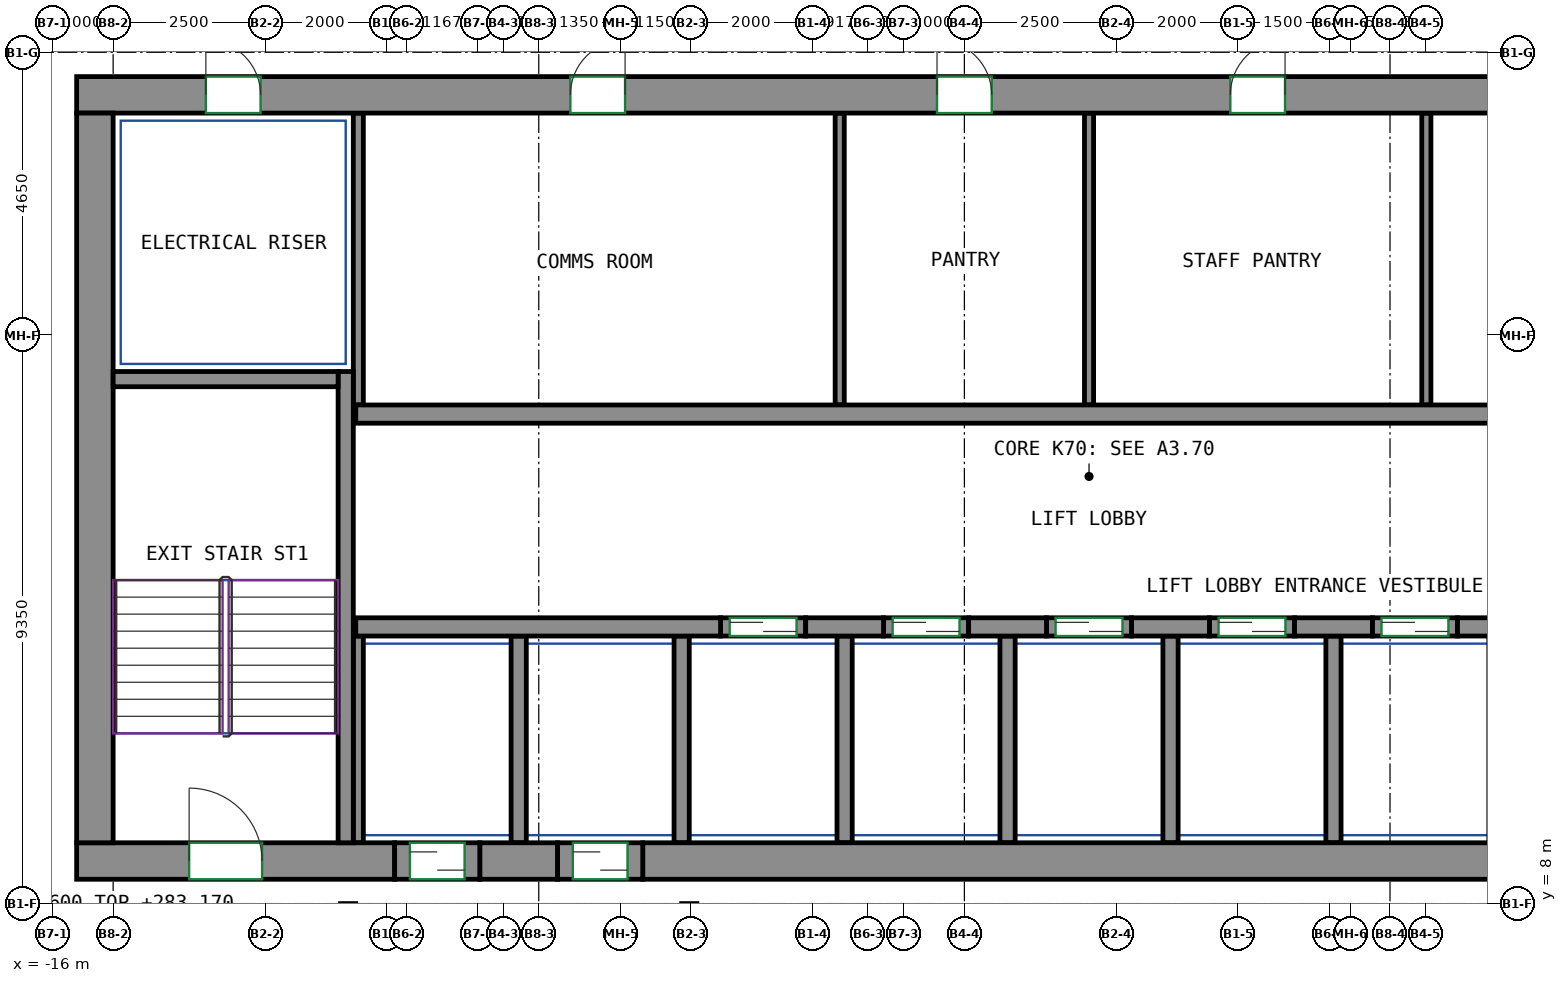
"""IFC4 building model, lengths in metres.
Left out: names, types, materials, properties, quantities, classifications, styles, units other than length and angle.
Written with IfcOpenShell. Run it as: python <this file> out.ifc"""

import sys

from ifc_helpers import new_model, si_unit, direction, frame, frame_2d, origin, place, context, subcontext, project, spatial, rectangle, extrude, source, transform, mapped, element, fill, save


model = new_model("IFC4")
c1 = context("Model", 3, precision=1e-05, world=origin(), true_north=direction((0.0, 1.0)))
c2 = subcontext(c1, "Body", "Model", "MODEL_VIEW")
j1 = project(units=[si_unit("LENGTHUNIT", "METRE"), si_unit("PLANEANGLEUNIT", "RADIAN")], contexts=[c1])
p1 = place(None, origin())
s1 = spatial("IfcSite", under=j1, at=p1, CompositionType="ELEMENT")
p2 = place(p1, origin())
s2 = spatial("IfcBuilding", under=s1, at=p2, CompositionType="ELEMENT")
p3 = place(p2, frame((0.0, 0.0, 280.6)))
s3 = spatial("IfcBuildingStorey", under=s2, at=p3, CompositionType="ELEMENT", Elevation=280.6)
m1 = source(origin(), c2, "Body", "SweptSolid", [
    extrude(rectangle(XDim=5.23, YDim=0.6, at=frame_2d((2.615, 0.0))), origin(), (0.0, 0.0, 1.0), 3.12),
])
p4 = place(p3, frame((-15.6, 8.7, 0.0), z_axis=(0.0, 0.0, 1.0), x_axis=(1.0, 0.0, 0.0)))
e1 = element("IfcWall", 1, at=p4, inside=s3, PredefinedType="SHEAR", context=c2, shape_type="MappedRepresentation", body=[
    mapped(m1, transform((0.0, 0.0, 0.0))),
])
p5 = place(p4, frame((1.85, 0.0, 0.0)))
e2 = element("IfcOpeningElement", 2, at=p5, cuts=e1, PredefinedType="OPENING", context=c2, shape_type="SweptSolid", body=[
    extrude(rectangle(XDim=1.2, YDim=2.1, at=frame_2d((0.6, 1.05))), frame((0.0, 0.31, 0.0), z_axis=(0.0, -1.0, 0.0), x_axis=(1.0, 0.0, 0.0)), (0.0, 0.0, 1.0), 0.62),
])
m2 = source(origin(), c2, "Body", "SweptSolid", [
    extrude(rectangle(XDim=1.28, YDim=0.6, at=frame_2d((0.64, 0.0))), origin(), (0.0, 0.0, 1.0), 3.12),
])
p6 = place(p3, frame((-8.97, 8.7, 0.0), z_axis=(0.0, 0.0, 1.0), x_axis=(1.0, 0.0, 0.0)))
e3 = element("IfcWall", 3, at=p6, inside=s3, PredefinedType="SHEAR", context=c2, shape_type="MappedRepresentation", body=[
    mapped(m2, transform((0.0, 0.0, 0.0))),
])
m3 = source(origin(), c2, "Body", "SweptSolid", [
    extrude(rectangle(XDim=14.18, YDim=0.6, at=frame_2d((7.09, 0.0))), origin(), (0.0, 0.0, 1.0), 3.12),
])
p7 = place(p3, frame((-6.29, 8.7, 0.0), z_axis=(0.0, 0.0, 1.0), x_axis=(1.0, 0.0, 0.0)))
e4 = element("IfcWall", 4, at=p7, inside=s3, PredefinedType="SHEAR", context=c2, shape_type="MappedRepresentation", body=[
    mapped(m3, transform((0.0, 0.0, 0.0))),
])
m4 = source(origin(), c2, "Body", "SweptSolid", [
    extrude(rectangle(XDim=33.3, YDim=0.6, at=frame_2d((16.65, 0.0))), origin(), (0.0, 0.0, 1.0), 3.12),
])
p8 = place(p3, frame((-15.6, 21.3, 0.0), z_axis=(0.0, 0.0, 1.0), x_axis=(1.0, 0.0, 0.0)))
e5 = element("IfcWall", 5, at=p8, inside=s3, PredefinedType="SHEAR", context=c2, shape_type="MappedRepresentation", body=[
    mapped(m4, transform((0.0, 0.0, 0.0))),
])
p9 = place(p8, frame((8.12, 0.0, 0.0)))
e6 = element("IfcOpeningElement", 6, at=p9, cuts=e5, PredefinedType="OPENING", context=c2, shape_type="SweptSolid", body=[
    extrude(rectangle(XDim=0.9, YDim=2.1, at=frame_2d((0.45, 1.05))), frame((0.0, 0.31, 0.0), z_axis=(0.0, -1.0, 0.0), x_axis=(1.0, 0.0, 0.0)), (0.0, 0.0, 1.0), 0.62),
])
p10 = place(p8, frame((14.15, 0.0, 0.0)))
e7 = element("IfcOpeningElement", 7, at=p10, cuts=e5, PredefinedType="OPENING", context=c2, shape_type="SweptSolid", body=[
    extrude(rectangle(XDim=0.9, YDim=2.1, at=frame_2d((0.45, 1.05))), frame((0.0, 0.31, 0.0), z_axis=(0.0, -1.0, 0.0), x_axis=(1.0, 0.0, 0.0)), (0.0, 0.0, 1.0), 0.62),
])
p11 = place(p8, frame((18.974, 0.0, 0.0)))
e8 = element("IfcOpeningElement", 8, at=p11, cuts=e5, PredefinedType="OPENING", context=c2, shape_type="SweptSolid", body=[
    extrude(rectangle(XDim=0.9, YDim=2.1, at=frame_2d((0.45, 1.05))), frame((0.0, 0.31, 0.0), z_axis=(0.0, -1.0, 0.0), x_axis=(1.0, 0.0, 0.0)), (0.0, 0.0, 1.0), 0.62),
])
p12 = place(p8, frame((23.664, 0.0, 0.0)))
e9 = element("IfcOpeningElement", 9, at=p12, cuts=e5, PredefinedType="OPENING", context=c2, shape_type="SweptSolid", body=[
    extrude(rectangle(XDim=0.9, YDim=2.1, at=frame_2d((0.45, 1.05))), frame((0.0, 0.31, 0.0), z_axis=(0.0, -1.0, 0.0), x_axis=(1.0, 0.0, 0.0)), (0.0, 0.0, 1.0), 0.62),
])
p13 = place(p8, frame((26.92, 0.0, 0.0)))
e10 = element("IfcOpeningElement", 10, at=p13, cuts=e5, PredefinedType="OPENING", context=c2, shape_type="SweptSolid", body=[
    extrude(rectangle(XDim=0.9, YDim=2.1, at=frame_2d((0.45, 1.05))), frame((0.0, 0.31, 0.0), z_axis=(0.0, -1.0, 0.0), x_axis=(1.0, 0.0, 0.0)), (0.0, 0.0, 1.0), 0.62),
])
p14 = place(p8, frame((2.125, 0.0, 0.0)))
e11 = element("IfcOpeningElement", 11, at=p14, cuts=e5, PredefinedType="OPENING", context=c2, shape_type="SweptSolid", body=[
    extrude(rectangle(XDim=0.9, YDim=2.1, at=frame_2d((0.45, 1.05))), frame((0.0, 0.31, 0.0), z_axis=(0.0, -1.0, 0.0), x_axis=(1.0, 0.0, 0.0)), (0.0, 0.0, 1.0), 0.62),
])
p15 = place(p8, frame((30.275, 0.0, 0.0)))
e12 = element("IfcOpeningElement", 12, at=p15, cuts=e5, PredefinedType="OPENING", context=c2, shape_type="SweptSolid", body=[
    extrude(rectangle(XDim=0.9, YDim=2.1, at=frame_2d((0.45, 1.05))), frame((0.0, 0.31, 0.0), z_axis=(0.0, -1.0, 0.0), x_axis=(1.0, 0.0, 0.0)), (0.0, 0.0, 1.0), 0.62),
])
m5 = source(origin(), c2, "Body", "SweptSolid", [
    extrude(rectangle(XDim=12.0, YDim=0.6, at=frame_2d((6.0, 0.0))), origin(), (0.0, 0.0, 1.0), 3.12),
])
p16 = place(p3, frame((-15.3, 9.0, 0.0), z_axis=(0.0, 0.0, 1.0), x_axis=(0.0, 1.0, 0.0)))
e13 = element("IfcWall", 13, at=p16, inside=s3, PredefinedType="SHEAR", context=c2, shape_type="MappedRepresentation", body=[
    mapped(m5, transform((0.0, 0.0, 0.0))),
])
m6 = source(origin(), c2, "Body", "SweptSolid", [
    extrude(rectangle(XDim=7.75, YDim=0.25, at=frame_2d((3.875, 0.0))), origin(), (0.0, 0.0, 1.0), 3.12),
])
p17 = place(p3, frame((-11.175, 9.0, 0.0), z_axis=(0.0, 0.0, 1.0), x_axis=(0.0, 1.0, 0.0)))
e14 = element("IfcWall", 14, at=p17, inside=s3, PredefinedType="SHEAR", context=c2, shape_type="MappedRepresentation", body=[
    mapped(m6, transform((0.0, 0.0, 0.0))),
])
m7 = source(origin(), c2, "Body", "SweptSolid", [
    extrude(rectangle(XDim=3.7, YDim=0.25, at=frame_2d((1.85, 0.0))), origin(), (0.0, 0.0, 1.0), 3.12),
])
p18 = place(p3, frame((-15.0, 16.625, 0.0), z_axis=(0.0, 0.0, 1.0), x_axis=(1.0, 0.0, 0.0)))
e15 = element("IfcWall", 15, at=p18, inside=s3, PredefinedType="SHEAR", context=c2, shape_type="MappedRepresentation", body=[
    mapped(m7, transform((0.0, 0.0, 0.0))),
])
m8 = source(origin(), c2, "Body", "SweptSolid", [
    extrude(rectangle(XDim=6.0, YDim=0.3, at=frame_2d((3.0, 0.0))), origin(), (0.0, 0.0, 1.0), 3.12),
])
p19 = place(p3, frame((-11.01, 12.55, 0.0), z_axis=(0.0, 0.0, 1.0), x_axis=(1.0, 0.0, 0.0)))
e16 = element("IfcWall", 16, at=p19, inside=s3, PredefinedType="SHEAR", context=c2, shape_type="MappedRepresentation", body=[
    mapped(m8, transform((0.0, 0.0, 0.0))),
])
m9 = source(origin(), c2, "Body", "SweptSolid", [
    extrude(rectangle(XDim=1.28, YDim=0.3, at=frame_2d((0.64, 0.0))), origin(), (0.0, 0.0, 1.0), 3.12),
])
for number, where, z_axis, x_axis in (
    (17, (-3.61, 12.55, 0.0), (0.0, 0.0, 1.0), (1.0, 0.0, 0.0)),
    (18, (-0.93, 12.55, 0.0), (0.0, 0.0, 1.0), (1.0, 0.0, 0.0)),
    (19, (1.75, 12.55, 0.0), (0.0, 0.0, 1.0), (1.0, 0.0, 0.0)),
    (20, (4.43, 12.55, 0.0), (0.0, 0.0, 1.0), (1.0, 0.0, 0.0)),
):
    element("IfcWall", number, at=place(p3, frame(where, z_axis=z_axis, x_axis=x_axis)), inside=s3, PredefinedType="SHEAR", context=c2, shape_type="MappedRepresentation", body=[
        mapped(m9, transform((0.0, 0.0, 0.0))),
    ])
m10 = source(origin(), c2, "Body", "SweptSolid", [
    extrude(rectangle(XDim=0.78, YDim=0.3, at=frame_2d((0.39, 0.0))), origin(), (0.0, 0.0, 1.0), 3.12),
])
p20 = place(p3, frame((7.11, 12.55, 0.0), z_axis=(0.0, 0.0, 1.0), x_axis=(1.0, 0.0, 0.0)))
e21 = element("IfcWall", 21, at=p20, inside=s3, PredefinedType="SHEAR", context=c2, shape_type="MappedRepresentation", body=[
    mapped(m10, transform((0.0, 0.0, 0.0))),
])
m11 = source(origin(), c2, "Body", "SweptSolid", [
    extrude(rectangle(XDim=22.08, YDim=0.3, at=frame_2d((11.04, 0.0))), origin(), (0.0, 0.0, 1.0), 3.12),
])
p21 = place(p3, frame((-11.01, 16.05, 0.0), z_axis=(0.0, 0.0, 1.0), x_axis=(1.0, 0.0, 0.0)))
e22 = element("IfcWall", 22, at=p21, inside=s3, PredefinedType="SHEAR", context=c2, shape_type="MappedRepresentation", body=[
    mapped(m11, transform((0.0, 0.0, 0.0))),
])
m12 = source(origin(), c2, "Body", "SweptSolid", [
    extrude(rectangle(XDim=1.4, YDim=0.3, at=frame_2d((0.7, 0.0))), origin(), (0.0, 0.0, 1.0), 3.12),
])
p22 = place(p3, frame((-5.01, 12.55, 0.0), z_axis=(0.0, 0.0, 1.0), x_axis=(1.0, 0.0, 0.0)))
e23 = element("IfcWall", 23, at=p22, inside=s3, PredefinedType="PARTITIONING", context=c2, shape_type="MappedRepresentation", body=[
    mapped(m12, transform((0.0, 0.0, 0.0))),
])
p23 = place(p22, frame((0.15, 0.0, 0.0)))
e24 = element("IfcOpeningElement", 24, at=p23, cuts=e23, PredefinedType="OPENING", context=c2, shape_type="SweptSolid", body=[
    extrude(rectangle(XDim=1.1, YDim=2.1, at=frame_2d((0.55, 1.05))), frame((0.0, 0.16, 0.0), z_axis=(0.0, -1.0, 0.0), x_axis=(1.0, 0.0, 0.0)), (0.0, 0.0, 1.0), 0.32),
])
m13 = source(origin(), c2, "Body", "SweptSolid", [
    extrude(rectangle(XDim=1.4, YDim=0.3, at=frame_2d((0.7, 0.0))), origin(), (0.0, 0.0, 1.0), 3.12),
])
p24 = place(p3, frame((-2.33, 12.55, 0.0), z_axis=(0.0, 0.0, 1.0), x_axis=(1.0, 0.0, 0.0)))
e25 = element("IfcWall", 25, at=p24, inside=s3, PredefinedType="PARTITIONING", context=c2, shape_type="MappedRepresentation", body=[
    mapped(m13, transform((0.0, 0.0, 0.0))),
])
p25 = place(p24, frame((0.15, 0.0, 0.0)))
e26 = element("IfcOpeningElement", 26, at=p25, cuts=e25, PredefinedType="OPENING", context=c2, shape_type="SweptSolid", body=[
    extrude(rectangle(XDim=1.1, YDim=2.1, at=frame_2d((0.55, 1.05))), frame((0.0, 0.16, 0.0), z_axis=(0.0, -1.0, 0.0), x_axis=(1.0, 0.0, 0.0)), (0.0, 0.0, 1.0), 0.32),
])
p26 = place(p3, frame((0.35, 12.55, 0.0), z_axis=(0.0, 0.0, 1.0), x_axis=(1.0, 0.0, 0.0)))
e27 = element("IfcWall", 27, at=p26, inside=s3, PredefinedType="PARTITIONING", context=c2, shape_type="MappedRepresentation", body=[
    mapped(m12, transform((0.0, 0.0, 0.0))),
])
p27 = place(p26, frame((0.15, 0.0, 0.0)))
e28 = element("IfcOpeningElement", 28, at=p27, cuts=e27, PredefinedType="OPENING", context=c2, shape_type="SweptSolid", body=[
    extrude(rectangle(XDim=1.1, YDim=2.1, at=frame_2d((0.55, 1.05))), frame((0.0, 0.16, 0.0), z_axis=(0.0, -1.0, 0.0), x_axis=(1.0, 0.0, 0.0)), (0.0, 0.0, 1.0), 0.32),
])
p28 = place(p3, frame((3.03, 12.55, 0.0), z_axis=(0.0, 0.0, 1.0), x_axis=(1.0, 0.0, 0.0)))
e29 = element("IfcWall", 29, at=p28, inside=s3, PredefinedType="PARTITIONING", context=c2, shape_type="MappedRepresentation", body=[
    mapped(m12, transform((0.0, 0.0, 0.0))),
])
p29 = place(p28, frame((0.15, 0.0, 0.0)))
e30 = element("IfcOpeningElement", 30, at=p29, cuts=e29, PredefinedType="OPENING", context=c2, shape_type="SweptSolid", body=[
    extrude(rectangle(XDim=1.1, YDim=2.1, at=frame_2d((0.55, 1.05))), frame((0.0, 0.16, 0.0), z_axis=(0.0, -1.0, 0.0), x_axis=(1.0, 0.0, 0.0)), (0.0, 0.0, 1.0), 0.32),
])
p30 = place(p3, frame((5.71, 12.55, 0.0), z_axis=(0.0, 0.0, 1.0), x_axis=(1.0, 0.0, 0.0)))
e31 = element("IfcWall", 31, at=p30, inside=s3, PredefinedType="PARTITIONING", context=c2, shape_type="MappedRepresentation", body=[
    mapped(m13, transform((0.0, 0.0, 0.0))),
])
p31 = place(p30, frame((0.15, 0.0, 0.0)))
e32 = element("IfcOpeningElement", 32, at=p31, cuts=e31, PredefinedType="OPENING", context=c2, shape_type="SweptSolid", body=[
    extrude(rectangle(XDim=1.1, YDim=2.1, at=frame_2d((0.55, 1.05))), frame((0.0, 0.16, 0.0), z_axis=(0.0, -1.0, 0.0), x_axis=(1.0, 0.0, 0.0)), (0.0, 0.0, 1.0), 0.32),
])
m14 = source(origin(), c2, "Body", "SweptSolid", [
    extrude(rectangle(XDim=4.8, YDim=0.165, at=frame_2d((2.4, 0.0))), origin(), (0.0, 0.0, 1.0), 3.12),
])
p32 = place(p3, frame((-10.968, 16.2, 0.0), z_axis=(0.0, 0.0, 1.0), x_axis=(0.0, 1.0, 0.0)))
e33 = element("IfcWall", 33, at=p32, inside=s3, PredefinedType="PARTITIONING", context=c2, shape_type="MappedRepresentation", body=[
    mapped(m14, transform((0.0, 0.0, 0.0))),
])
m15 = source(origin(), c2, "Body", "SweptSolid", [
    extrude(rectangle(XDim=3.4, YDim=0.25, at=frame_2d((1.7, 0.0))), origin(), (0.0, 0.0, 1.0), 3.12),
])
for number, where, z_axis, x_axis in (
    (34, (2.39, 9.0, 0.0), (0.0, 0.0, 1.0), (0.0, 1.0, 0.0)),
    (35, (5.07, 9.0, 0.0), (0.0, 0.0, 1.0), (0.0, 1.0, 0.0)),
    (36, (-0.29, 9.0, 0.0), (0.0, 0.0, 1.0), (0.0, 1.0, 0.0)),
):
    element("IfcWall", number, at=place(p3, frame(where, z_axis=z_axis, x_axis=x_axis)), inside=s3, PredefinedType="PARTITIONING", context=c2, shape_type="MappedRepresentation", body=[
        mapped(m15, transform((0.0, 0.0, 0.0))),
    ])
m16 = source(origin(), c2, "Body", "SweptSolid", [
    extrude(rectangle(XDim=3.4, YDim=0.165, at=frame_2d((1.7, 0.0))), origin(), (0.0, 0.0, 1.0), 3.12),
])
p33 = place(p3, frame((-10.968, 9.0, 0.0), z_axis=(0.0, 0.0, 1.0), x_axis=(0.0, 1.0, 0.0)))
e37 = element("IfcWall", 37, at=p33, inside=s3, PredefinedType="PARTITIONING", context=c2, shape_type="MappedRepresentation", body=[
    mapped(m16, transform((0.0, 0.0, 0.0))),
])
for number, where, z_axis, x_axis in (
    (38, (-2.97, 9.0, 0.0), (0.0, 0.0, 1.0), (0.0, 1.0, 0.0)),
    (39, (-5.65, 9.0, 0.0), (0.0, 0.0, 1.0), (0.0, 1.0, 0.0)),
    (40, (-8.33, 9.0, 0.0), (0.0, 0.0, 1.0), (0.0, 1.0, 0.0)),
):
    element("IfcWall", number, at=place(p3, frame(where, z_axis=z_axis, x_axis=x_axis)), inside=s3, PredefinedType="PARTITIONING", context=c2, shape_type="MappedRepresentation", body=[
        mapped(m15, transform((0.0, 0.0, 0.0))),
    ])
m17 = source(origin(), c2, "Body", "SweptSolid", [
    extrude(rectangle(XDim=4.8, YDim=0.15, at=frame_2d((2.4, 0.0))), origin(), (0.0, 0.0, 1.0), 3.12),
])
for number, where, z_axis, x_axis in (
    (41, (-3.05, 16.2, 0.0), (0.0, 0.0, 1.0), (0.0, 1.0, 0.0)),
    (42, (1.05, 16.2, 0.0), (0.0, 0.0, 1.0), (0.0, 1.0, 0.0)),
    (43, (6.598, 16.2, 0.0), (0.0, 0.0, 1.0), (0.0, 1.0, 0.0)),
):
    element("IfcWall", number, at=place(p3, frame(where, z_axis=z_axis, x_axis=x_axis)), inside=s3, PredefinedType="PARTITIONING", context=c2, shape_type="MappedRepresentation", body=[
        mapped(m17, transform((0.0, 0.0, 0.0))),
    ])
m18 = source(origin(), c2, "Body", "SweptSolid", [
    extrude(rectangle(XDim=1.4, YDim=0.6, at=frame_2d((0.7, 0.0))), origin(), (0.0, 0.0, 1.0), 2.7),
])
p34 = place(p3, frame((-10.37, 8.7, 0.0), z_axis=(0.0, 0.0, 1.0), x_axis=(1.0, 0.0, 0.0)))
e44 = element("IfcWall", 44, at=p34, inside=s3, PredefinedType="PARTITIONING", context=c2, shape_type="MappedRepresentation", body=[
    mapped(m18, transform((0.0, 0.0, 0.0))),
])
p35 = place(p34, frame((0.25, 0.0, 0.0)))
e45 = element("IfcOpeningElement", 45, at=p35, cuts=e44, PredefinedType="OPENING", context=c2, shape_type="SweptSolid", body=[
    extrude(rectangle(XDim=0.9, YDim=2.1, at=frame_2d((0.45, 1.05))), frame((0.0, 0.31, 0.0), z_axis=(0.0, -1.0, 0.0), x_axis=(1.0, 0.0, 0.0)), (0.0, 0.0, 1.0), 0.62),
])
m19 = source(origin(), c2, "Body", "SweptSolid", [
    extrude(rectangle(XDim=1.4, YDim=0.6, at=frame_2d((0.7, 0.0))), origin(), (0.0, 0.0, 1.0), 2.7),
])
p36 = place(p3, frame((-7.69, 8.7, 0.0), z_axis=(0.0, 0.0, 1.0), x_axis=(1.0, 0.0, 0.0)))
e46 = element("IfcWall", 46, at=p36, inside=s3, PredefinedType="PARTITIONING", context=c2, shape_type="MappedRepresentation", body=[
    mapped(m19, transform((0.0, 0.0, 0.0))),
])
p37 = place(p36, frame((0.25, 0.0, 0.0)))
e47 = element("IfcOpeningElement", 47, at=p37, cuts=e46, PredefinedType="OPENING", context=c2, shape_type="SweptSolid", body=[
    extrude(rectangle(XDim=0.9, YDim=2.1, at=frame_2d((0.45, 1.05))), frame((0.0, 0.31, 0.0), z_axis=(0.0, -1.0, 0.0), x_axis=(1.0, 0.0, 0.0)), (0.0, 0.0, 1.0), 0.62),
])
p38 = place(p35, origin())
e48 = element("IfcDoor", 48, at=p38, inside=s3, OperationType="SLIDING_TO_LEFT", PredefinedType="DOOR", context=c2, shape_type="SweptSolid", body=[
    extrude(rectangle(XDim=0.9, YDim=2.1, at=frame_2d((0.45, 1.05))), frame((0.0, 0.205, 0.0), z_axis=(0.0, -1.0, 0.0), x_axis=(1.0, 0.0, 0.0)), (0.0, 0.0, 1.0), 0.05),
])
fill(e45, e48)
p39 = place(p37, origin())
e49 = element("IfcDoor", 49, at=p39, inside=s3, OperationType="SLIDING_TO_RIGHT", PredefinedType="DOOR", context=c2, shape_type="SweptSolid", body=[
    extrude(rectangle(XDim=0.9, YDim=2.1, at=frame_2d((0.45, 1.05))), frame((0.0, 0.205, 0.0), z_axis=(0.0, -1.0, 0.0), x_axis=(1.0, 0.0, 0.0)), (0.0, 0.0, 1.0), 0.05),
])
fill(e47, e49)
p40 = place(p23, origin())
e50 = element("IfcDoor", 50, at=p40, inside=s3, OperationType="DOUBLE_DOOR_SLIDING", PredefinedType="DOOR", context=c2, shape_type="SweptSolid", body=[
    extrude(rectangle(XDim=1.1, YDim=2.1, at=frame_2d((0.55, 1.05))), frame((0.0, 0.025, 0.0), z_axis=(0.0, -1.0, 0.0), x_axis=(1.0, 0.0, 0.0)), (0.0, 0.0, 1.0), 0.05),
])
fill(e24, e50)
p41 = place(p25, origin())
e51 = element("IfcDoor", 51, at=p41, inside=s3, OperationType="DOUBLE_DOOR_SLIDING", PredefinedType="DOOR", context=c2, shape_type="SweptSolid", body=[
    extrude(rectangle(XDim=1.1, YDim=2.1, at=frame_2d((0.55, 1.05))), frame((0.0, 0.025, 0.0), z_axis=(0.0, -1.0, 0.0), x_axis=(1.0, 0.0, 0.0)), (0.0, 0.0, 1.0), 0.05),
])
fill(e26, e51)
p42 = place(p27, origin())
e52 = element("IfcDoor", 52, at=p42, inside=s3, OperationType="DOUBLE_DOOR_SLIDING", PredefinedType="DOOR", context=c2, shape_type="SweptSolid", body=[
    extrude(rectangle(XDim=1.1, YDim=2.1, at=frame_2d((0.55, 1.05))), frame((0.0, 0.025, 0.0), z_axis=(0.0, -1.0, 0.0), x_axis=(1.0, 0.0, 0.0)), (0.0, 0.0, 1.0), 0.05),
])
fill(e28, e52)
p43 = place(p29, origin())
e53 = element("IfcDoor", 53, at=p43, inside=s3, OperationType="DOUBLE_DOOR_SLIDING", PredefinedType="DOOR", context=c2, shape_type="SweptSolid", body=[
    extrude(rectangle(XDim=1.1, YDim=2.1, at=frame_2d((0.55, 1.05))), frame((0.0, 0.025, 0.0), z_axis=(0.0, -1.0, 0.0), x_axis=(1.0, 0.0, 0.0)), (0.0, 0.0, 1.0), 0.05),
])
fill(e30, e53)
p44 = place(p31, origin())
e54 = element("IfcDoor", 54, at=p44, inside=s3, OperationType="DOUBLE_DOOR_SLIDING", PredefinedType="DOOR", context=c2, shape_type="SweptSolid", body=[
    extrude(rectangle(XDim=1.1, YDim=2.1, at=frame_2d((0.55, 1.05))), frame((0.0, 0.025, 0.0), z_axis=(0.0, -1.0, 0.0), x_axis=(1.0, 0.0, 0.0)), (0.0, 0.0, 1.0), 0.05),
])
fill(e32, e54)
p45 = place(p9, origin())
e55 = element("IfcDoor", 55, at=p45, inside=s3, OperationType="SINGLE_SWING_RIGHT", PredefinedType="DOOR", context=c2, shape_type="SweptSolid", body=[
    extrude(rectangle(XDim=0.9, YDim=2.1, at=frame_2d((0.45, 1.05))), frame((0.0, -0.155, 0.0), z_axis=(0.0, -1.0, 0.0), x_axis=(1.0, 0.0, 0.0)), (0.0, 0.0, 1.0), 0.05),
])
fill(e6, e55)
p46 = place(p10, origin())
e56 = element("IfcDoor", 56, at=p46, inside=s3, OperationType="SINGLE_SWING_LEFT", PredefinedType="DOOR", context=c2, shape_type="SweptSolid", body=[
    extrude(rectangle(XDim=0.9, YDim=2.1, at=frame_2d((0.45, 1.05))), frame((0.0, -0.155, 0.0), z_axis=(0.0, -1.0, 0.0), x_axis=(1.0, 0.0, 0.0)), (0.0, 0.0, 1.0), 0.05),
])
fill(e7, e56)
p47 = place(p11, origin())
e57 = element("IfcDoor", 57, at=p47, inside=s3, OperationType="SINGLE_SWING_RIGHT", PredefinedType="DOOR", context=c2, shape_type="SweptSolid", body=[
    extrude(rectangle(XDim=0.9, YDim=2.1, at=frame_2d((0.45, 1.05))), frame((0.0, -0.155, 0.0), z_axis=(0.0, -1.0, 0.0), x_axis=(1.0, 0.0, 0.0)), (0.0, 0.0, 1.0), 0.05),
])
fill(e8, e57)
p48 = place(p14, origin())
e58 = element("IfcDoor", 58, at=p48, inside=s3, OperationType="SINGLE_SWING_LEFT", PredefinedType="DOOR", context=c2, shape_type="SweptSolid", body=[
    extrude(rectangle(XDim=0.9, YDim=2.1, at=frame_2d((0.45, 1.05))), frame((0.0, -0.155, 0.0), z_axis=(0.0, -1.0, 0.0), x_axis=(1.0, 0.0, 0.0)), (0.0, 0.0, 1.0), 0.05),
])
fill(e11, e58)
p49 = place(p5, origin())
e59 = element("IfcDoor", 59, at=p49, inside=s3, OperationType="DOUBLE_DOOR_SINGLE_SWING", PredefinedType="DOOR", context=c2, shape_type="SweptSolid", body=[
    extrude(rectangle(XDim=1.2, YDim=2.1, at=frame_2d((0.6, 1.05))), frame((0.0, 0.205, 0.0), z_axis=(0.0, -1.0, 0.0), x_axis=(1.0, 0.0, 0.0)), (0.0, 0.0, 1.0), 0.05),
])
fill(e2, e59)
save(model, sys.argv[1])
